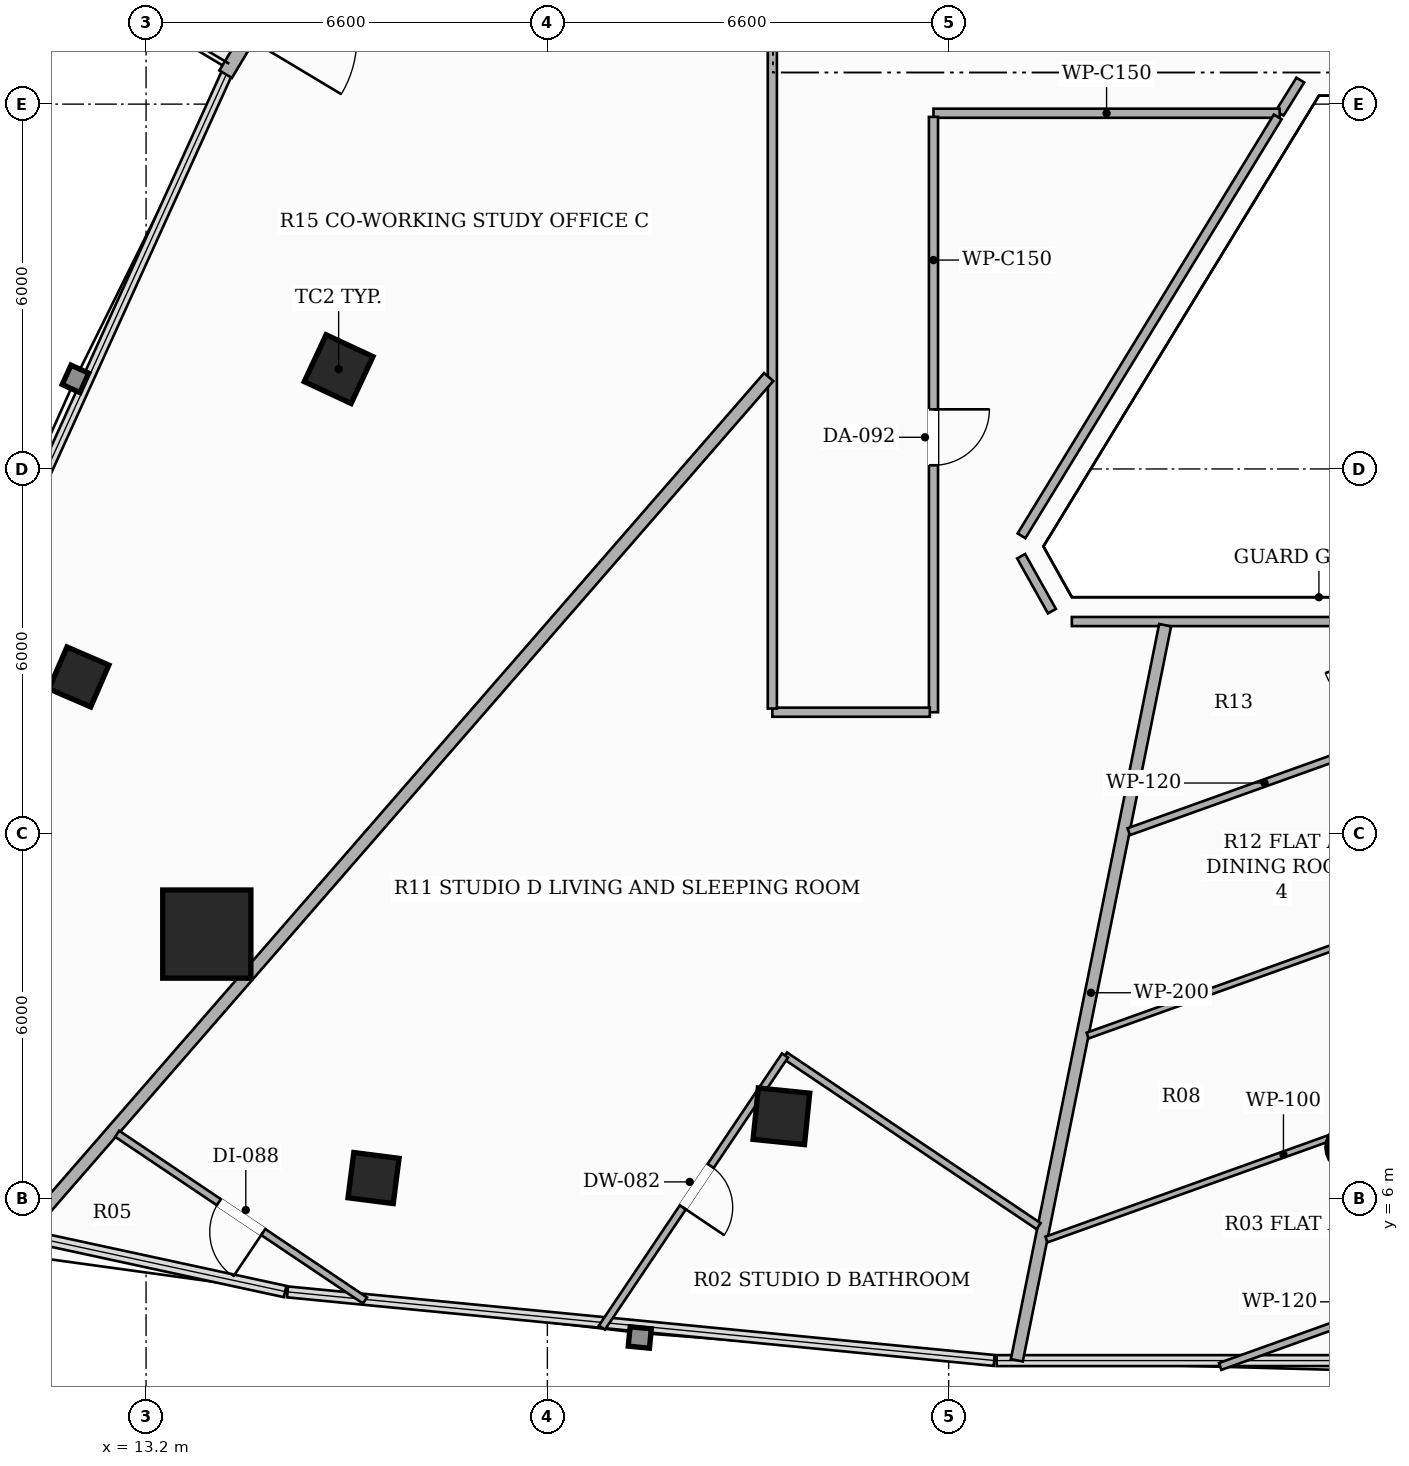
"""IFC4 building model, lengths in metres.
Left out: names, types, materials, properties, quantities, classifications, styles, units other than length and angle.
Written with IfcOpenShell. Run it as: python <this file> out.ifc"""

import sys

from ifc_helpers import new_model, si_unit, direction, frame, frame_2d, origin, origin_2d, place, context, subcontext, project, spatial, rectangle, hollow_rectangle, hollow_circle, extrude, element, fill, save


model = new_model("IFC4")
c1 = context("Model", 3, precision=1e-05, world=origin(), true_north=direction((0.0, 1.0)))
c2 = subcontext(c1, "Body", "Model", "MODEL_VIEW")
j1 = project(units=[si_unit("LENGTHUNIT", "METRE"), si_unit("PLANEANGLEUNIT", "RADIAN")], contexts=[c1])
p1 = place(None, origin())
s1 = spatial("IfcSite", under=j1, at=p1, CompositionType="ELEMENT")
p2 = place(p1, origin())
s2 = spatial("IfcBuilding", under=s1, at=p2, CompositionType="ELEMENT")
p3 = place(p2, frame((0.0, 0.0, 143.0)))
s3 = spatial("IfcBuildingStorey", under=s2, at=p3, CompositionType="ELEMENT", Elevation=143.0)
p4 = place(p3, frame((14.199, 10.351, 0.0), z_axis=(0.0, 0.0, 1.0), x_axis=(1.0, 0.0, 0.0)))
e1 = element("IfcColumn", 1, at=p4, inside=s3, PredefinedType="COLUMN", context=c2, shape_type="SweptSolid", body=[
    extrude(hollow_rectangle(XDim=1.45, YDim=1.45, WallThickness=0.045, at=origin_2d()), origin(), (0.0, 0.0, 1.0), 3.3),
])
for number, where, z_axis, x_axis in (
    (2, (16.367, 19.642, 0.0), (0.0, 0.0, 1.0), (0.423, 0.906, 0.0)),
    (3, (23.649, 7.355, 0.0), (0.0, 0.0, 1.0), (-0.995, 0.101, 0.0)),
):
    element("IfcColumn", number, at=place(p3, frame(where, z_axis=z_axis, x_axis=x_axis)), inside=s3, PredefinedType="COLUMN", context=c2, shape_type="SweptSolid", body=[
        extrude(hollow_rectangle(XDim=0.85, YDim=0.85, WallThickness=0.028, at=origin_2d()), origin(), (0.0, 0.0, 1.0), 3.3),
    ])
p5 = place(p3, frame((33.0, 6.844, 0.0), z_axis=(0.0, 0.0, 1.0), x_axis=(1.0, 0.0, 0.0)))
e4 = element("IfcColumn", 4, at=p5, inside=s3, PredefinedType="COLUMN", context=c2, shape_type="SweptSolid", body=[
    extrude(hollow_circle(Radius=0.381, WallThickness=0.022, at=origin_2d()), origin(), (0.0, 0.0, 1.0), 3.3),
])
for number, where, z_axis, x_axis in (
    (5, (12.095, 14.58, 0.0), (0.0, 0.0, 1.0), (0.397, 0.918, 0.0)),
    (6, (16.941, 6.339, 0.0), (0.0, 0.0, 1.0), (-0.992, 0.127, 0.0)),
):
    element("IfcColumn", number, at=place(p3, frame(where, z_axis=z_axis, x_axis=x_axis)), inside=s3, PredefinedType="COLUMN", context=c2, shape_type="SweptSolid", body=[
        extrude(hollow_rectangle(XDim=0.75, YDim=0.75, WallThickness=0.025, at=origin_2d()), origin(), (0.0, 0.0, 1.0), 3.3),
    ])
p6 = place(p3, frame((20.408, 34.327, 0.0), z_axis=(0.0, 0.0, 1.0), x_axis=(-0.514364263751, -0.857571807009, 0.0)))
e7 = element("IfcWall", 7, at=p6, inside=s3, PredefinedType="SOLIDWALL", context=c2, shape_type="SweptSolid", body=[
    extrude(rectangle(XDim=11.468, YDim=0.24, at=frame_2d((5.734, 0.0))), origin(), (0.0, 0.0, 1.0), 2.584),
])
p7 = place(p6, frame((8.972, 0.0, 0.0)))
e8 = element("IfcOpeningElement", 8, at=p7, cuts=e7, PredefinedType="OPENING", context=c2, shape_type="SweptSolid", body=[
    extrude(rectangle(XDim=1.8, YDim=2.2, at=frame_2d((0.9, 1.1))), frame((0.0, 0.13, 0.0), z_axis=(0.0, -1.0, 0.0), x_axis=(1.0, 0.0, 0.0)), (0.0, 0.0, 1.0), 0.26),
])
p8 = place(p3, frame((32.183, 24.396, 0.0), z_axis=(0.0, 0.0, 1.0), x_axis=(-0.527674894897, -0.849446411079, 0.0)))
e9 = element("IfcWall", 9, at=p8, inside=s3, PredefinedType="PARTITIONING", context=c2, shape_type="SweptSolid", body=[
    extrude(rectangle(XDim=0.643, YDim=0.15, at=frame_2d((0.321, 0.0))), origin(), (0.0, 0.0, 1.0), 3.02),
])
p9 = place(p3, frame((31.844, 23.85, 0.0), z_axis=(0.0, 0.0, 1.0), x_axis=(-1.0, 0.0, 0.0)))
e10 = element("IfcWall", 10, at=p9, inside=s3, PredefinedType="PARTITIONING", context=c2, shape_type="SweptSolid", body=[
    extrude(rectangle(XDim=5.694, YDim=0.15, at=frame_2d((2.847, 0.0))), origin(), (0.0, 0.0, 1.0), 2.681),
])
p10 = place(p3, frame((26.15, 23.79, 0.0), z_axis=(0.0, 0.0, 1.0), x_axis=(0.0, -1.0, 0.0)))
e11 = element("IfcWall", 11, at=p10, inside=s3, PredefinedType="PARTITIONING", context=c2, shape_type="SweptSolid", body=[
    extrude(rectangle(XDim=9.79, YDim=0.15, at=frame_2d((4.895, 0.0))), origin(), (0.0, 0.0, 1.0), 2.681),
])
p11 = place(p10, frame((4.809, 0.0, 0.0)))
e12 = element("IfcOpeningElement", 12, at=p11, cuts=e11, PredefinedType="OPENING", context=c2, shape_type="SweptSolid", body=[
    extrude(rectangle(XDim=0.92, YDim=2.15, at=frame_2d((0.46, 1.075))), frame((0.0, 0.085, 0.0), z_axis=(0.0, -1.0, 0.0), x_axis=(1.0, 0.0, 0.0)), (0.0, 0.0, 1.0), 0.17),
])
p12 = place(p3, frame((26.09, 14.0, 0.0), z_axis=(0.0, 0.0, 1.0), x_axis=(-1.0, 0.0, 0.0)))
e13 = element("IfcWall", 13, at=p12, inside=s3, PredefinedType="PARTITIONING", context=c2, shape_type="SweptSolid", body=[
    extrude(rectangle(XDim=2.59, YDim=0.15, at=frame_2d((1.295, 0.0))), origin(), (0.0, 0.0, 1.0), 2.681),
])
p13 = place(p3, frame((23.5, 14.06, 0.0), z_axis=(0.0, 0.0, 1.0), x_axis=(0.0, 1.0, 0.0)))
e14 = element("IfcWall", 14, at=p13, inside=s3, PredefinedType="PARTITIONING", context=c2, shape_type="SweptSolid", body=[
    extrude(rectangle(XDim=22.84, YDim=0.15, at=frame_2d((11.42, 0.0))), origin(), (0.0, 0.0, 1.0), 2.373),
])
p14 = place(p13, frame((13.533, 0.0, 0.0)))
e15 = element("IfcOpeningElement", 15, at=p14, cuts=e14, PredefinedType="OPENING", context=c2, shape_type="SweptSolid", body=[
    extrude(rectangle(XDim=0.88, YDim=2.1, at=frame_2d((0.44, 1.05))), frame((0.0, 0.085, 0.0), z_axis=(0.0, -1.0, 0.0), x_axis=(1.0, 0.0, 0.0)), (0.0, 0.0, 1.0), 0.17),
])
p15 = place(p3, frame((37.574, 15.491, 0.0), z_axis=(0.0, 0.0, 1.0), x_axis=(-1.0, 0.0, 0.0)))
e16 = element("IfcWall", 16, at=p15, inside=s3, PredefinedType="PARTITIONING", context=c2, shape_type="SweptSolid", body=[
    extrude(rectangle(XDim=9.148, YDim=0.15, at=frame_2d((4.574, 0.0))), origin(), (0.0, 0.0, 1.0), 2.681),
])
p16 = place(p3, frame((28.098, 15.662, 0.0), z_axis=(0.0, 0.0, 1.0), x_axis=(-0.488804496818, 0.872393353878, 0.0)))
e17 = element("IfcWall", 17, at=p16, inside=s3, PredefinedType="PARTITIONING", context=c2, shape_type="SweptSolid", body=[
    extrude(rectangle(XDim=1.035, YDim=0.15, at=frame_2d((0.518, 0.0))), origin(), (0.0, 0.0, 1.0), 3.02),
])
p17 = place(p3, frame((27.598, 16.901, 0.0), z_axis=(0.0, 0.0, 1.0), x_axis=(0.521816809014, 0.853057570057, 0.0)))
e18 = element("IfcWall", 18, at=p17, inside=s3, PredefinedType="PARTITIONING", context=c2, shape_type="SweptSolid", body=[
    extrude(rectangle(XDim=8.076, YDim=0.15, at=frame_2d((4.038, 0.0))), origin(), (0.0, 0.0, 1.0), 2.681),
])
p18 = place(p3, frame((27.521, 3.342, 0.0), z_axis=(0.0, 0.0, 1.0), x_axis=(0.197768112081, 0.980248832615, 0.0)))
e19 = element("IfcWall", 19, at=p18, inside=s3, PredefinedType="PARTITIONING", context=c2, shape_type="SweptSolid", body=[
    extrude(rectangle(XDim=12.333, YDim=0.2, at=frame_2d((6.166, 0.0))), origin(), (0.0, 0.0, 1.0), 2.373),
])
p19 = place(p3, frame((23.44, 19.512, 0.0), z_axis=(0.0, 0.0, 1.0), x_axis=(-0.656359216658, -0.754448526215, 0.0)))
e20 = element("IfcWall", 20, at=p19, inside=s3, PredefinedType="PARTITIONING", context=c2, shape_type="SweptSolid", body=[
    extrude(rectangle(XDim=19.085, YDim=0.2, at=frame_2d((9.543, 0.0))), origin(), (0.0, 0.0, 1.0), 2.373),
])
p20 = place(p3, frame((33.827, 13.636, 0.0), z_axis=(0.0, 0.0, 1.0), x_axis=(-0.941307932725, -0.337549071676, 0.0)))
e21 = element("IfcWall", 21, at=p20, inside=s3, PredefinedType="PARTITIONING", context=c2, shape_type="SweptSolid", body=[
    extrude(rectangle(XDim=4.743, YDim=0.12, at=frame_2d((2.372, 0.0))), origin(), (0.0, 0.0, 1.0), 2.681),
])
p21 = place(p3, frame((30.865, 3.241, 0.0), z_axis=(0.0, 0.0, 1.0), x_axis=(0.941328015911, 0.337493061354, 0.0)))
e22 = element("IfcWall", 22, at=p21, inside=s3, PredefinedType="PARTITIONING", context=c2, shape_type="SweptSolid", body=[
    extrude(rectangle(XDim=6.296, YDim=0.12, at=frame_2d((3.148, 0.0))), origin(), (0.0, 0.0, 1.0), 2.579),
])
p22 = place(p3, frame((28.008, 5.328, 0.0), z_axis=(0.0, 0.0, 1.0), x_axis=(0.941323677897, 0.337505160599, 0.0)))
e23 = element("IfcWall", 23, at=p22, inside=s3, PredefinedType="PARTITIONING", context=c2, shape_type="SweptSolid", body=[
    extrude(rectangle(XDim=8.282, YDim=0.1, at=frame_2d((4.141, 0.0))), origin(), (0.0, 0.0, 1.0), 2.373),
])
p23 = place(p3, frame((28.685, 8.682, 0.0), z_axis=(0.0, 0.0, 1.0), x_axis=(0.94133243901, 0.337480724291, 0.0)))
e24 = element("IfcWall", 24, at=p23, inside=s3, PredefinedType="PARTITIONING", context=c2, shape_type="SweptSolid", body=[
    extrude(rectangle(XDim=6.513, YDim=0.1, at=frame_2d((3.256, 0.0))), origin(), (0.0, 0.0, 1.0), 2.681),
])
p24 = place(p3, frame((27.879, 5.548, 0.0), z_axis=(0.0, 0.0, 1.0), x_axis=(-0.829629274352, 0.558314666777, 0.0)))
e25 = element("IfcWall", 25, at=p24, inside=s3, PredefinedType="PARTITIONING", context=c2, shape_type="SweptSolid", body=[
    extrude(rectangle(XDim=5.027, YDim=0.12, at=frame_2d((2.514, 0.0))), origin(), (0.0, 0.0, 1.0), 2.373),
])
p25 = place(p3, frame((23.708, 8.355, 0.0), z_axis=(0.0, 0.0, 1.0), x_axis=(-0.55815233332, -0.829738496642, 0.0)))
e26 = element("IfcWall", 26, at=p25, inside=s3, PredefinedType="PARTITIONING", context=c2, shape_type="SweptSolid", body=[
    extrude(rectangle(XDim=5.395, YDim=0.12, at=frame_2d((2.697, 0.0))), origin(), (0.0, 0.0, 1.0), 2.373),
])
p26 = place(p25, frame((2.19, 0.0, 0.0)))
e27 = element("IfcOpeningElement", 27, at=p26, cuts=e26, PredefinedType="OPENING", context=c2, shape_type="SweptSolid", body=[
    extrude(rectangle(XDim=0.82, YDim=2.1, at=frame_2d((0.41, 1.05))), frame((0.0, 0.07, 0.0), z_axis=(0.0, -1.0, 0.0), x_axis=(1.0, 0.0, 0.0)), (0.0, 0.0, 1.0), 0.14),
])
p27 = place(p3, frame((16.8, 4.326, 0.0), z_axis=(0.0, 0.0, 1.0), x_axis=(-0.829756434678, 0.558125666056, 0.0)))
e28 = element("IfcWall", 28, at=p27, inside=s3, PredefinedType="PARTITIONING", context=c2, shape_type="SweptSolid", body=[
    extrude(rectangle(XDim=4.911, YDim=0.12, at=frame_2d((2.456, 0.0))), origin(), (0.0, 0.0, 1.0), 3.02),
])
p28 = place(p27, frame((2.016, 0.0, 0.0)))
e29 = element("IfcOpeningElement", 29, at=p28, cuts=e28, PredefinedType="OPENING", context=c2, shape_type="SweptSolid", body=[
    extrude(rectangle(XDim=0.88, YDim=2.1, at=frame_2d((0.44, 1.05))), frame((0.0, 0.07, 0.0), z_axis=(0.0, -1.0, 0.0), x_axis=(1.0, 0.0, 0.0)), (0.0, 0.0, 1.0), 0.14),
])
p29 = place(p11, origin())
e30 = element("IfcDoor", 30, at=p29, inside=s3, OperationType="SINGLE_SWING_LEFT", PredefinedType="DOOR", context=c2, shape_type="SweptSolid", body=[
    extrude(rectangle(XDim=0.92, YDim=2.15, at=frame_2d((0.46, 1.075))), frame((0.0, 0.025, 0.0), z_axis=(0.0, -1.0, 0.0), x_axis=(1.0, 0.0, 0.0)), (0.0, 0.0, 1.0), 0.05),
])
fill(e12, e30)
p30 = place(p26, origin())
e31 = element("IfcDoor", 31, at=p30, inside=s3, OperationType="SINGLE_SWING_RIGHT", PredefinedType="DOOR", context=c2, shape_type="SweptSolid", body=[
    extrude(rectangle(XDim=0.82, YDim=2.1, at=frame_2d((0.41, 1.05))), frame((0.0, 0.025, 0.0), z_axis=(0.0, -1.0, 0.0), x_axis=(1.0, 0.0, 0.0)), (0.0, 0.0, 1.0), 0.05),
])
fill(e27, e31)
p31 = place(p28, origin())
e32 = element("IfcDoor", 32, at=p31, inside=s3, OperationType="SINGLE_SWING_LEFT", PredefinedType="DOOR", context=c2, shape_type="SweptSolid", body=[
    extrude(rectangle(XDim=0.88, YDim=2.1, at=frame_2d((0.44, 1.05))), frame((0.0, 0.025, 0.0), z_axis=(0.0, -1.0, 0.0), x_axis=(1.0, 0.0, 0.0)), (0.0, 0.0, 1.0), 0.05),
])
fill(e29, e32)
save(model, sys.argv[1])
